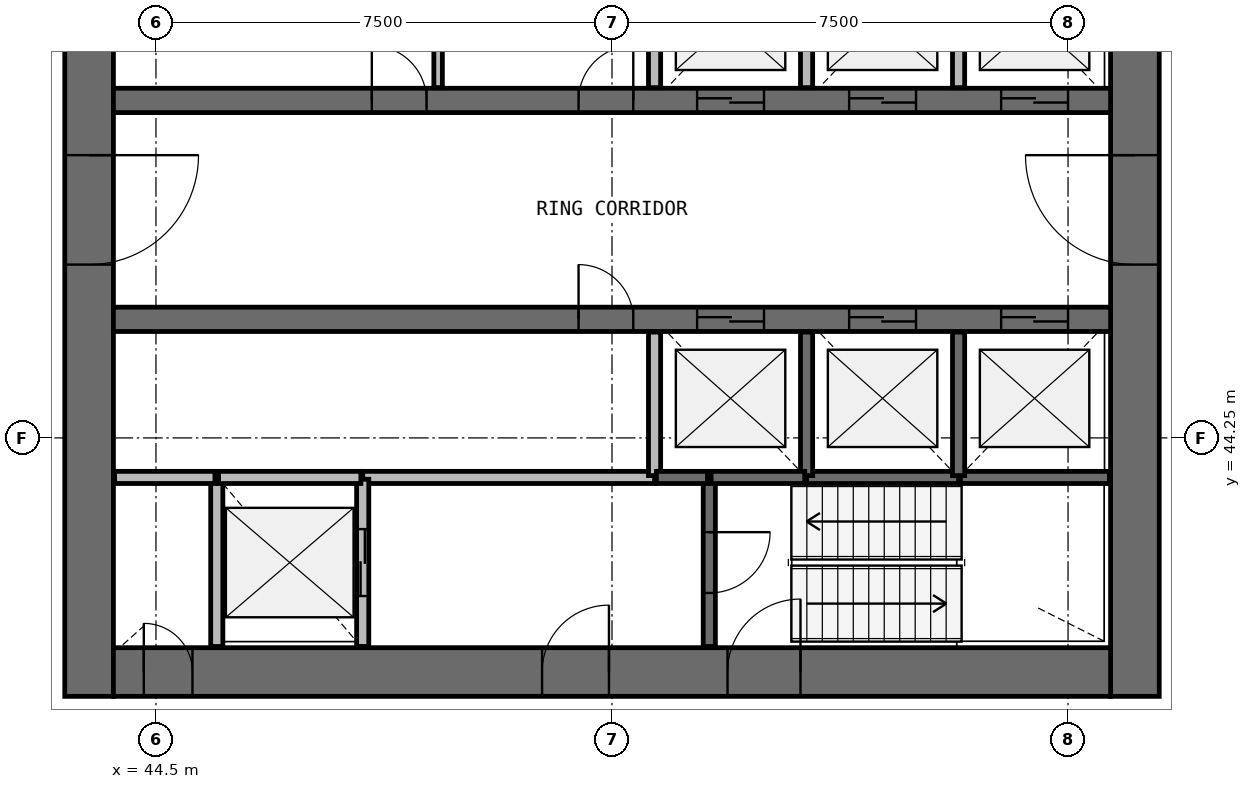
"""IFC4 building model, lengths in metres.
Left out: names, types, materials, properties, quantities, classifications, styles, units other than length and angle.
Written with IfcOpenShell. Run it as: python <this file> out.ifc"""

import sys

from ifc_helpers import new_model, si_unit, direction, frame, frame_2d, origin, place, context, subcontext, project, spatial, rectangle, extrude, source, transform, mapped, element, fill, save


model = new_model("IFC4")
c1 = context("Model", 3, precision=1e-05, world=origin(), true_north=direction((0.0, 1.0)))
c2 = subcontext(c1, "Body", "Model", "MODEL_VIEW")
j1 = project(units=[si_unit("LENGTHUNIT", "METRE"), si_unit("PLANEANGLEUNIT", "RADIAN")], contexts=[c1])
p1 = place(None, origin())
s1 = spatial("IfcSite", under=j1, at=p1, CompositionType="ELEMENT")
p2 = place(p1, origin())
s2 = spatial("IfcBuilding", under=s1, at=p2, CompositionType="ELEMENT")
p3 = place(p2, frame((0.0, 0.0, 164.3)))
s3 = spatial("IfcBuildingStorey", under=s2, at=p3, CompositionType="ELEMENT", Elevation=164.3)
p4 = place(p3, frame((60.6, 40.0, 0.0), z_axis=(0.0, 0.0, 1.0), x_axis=(0.0, 1.0, 0.0)))
e1 = element("IfcWall", 1, at=p4, inside=s3, PredefinedType="SHEAR", context=c2, shape_type="SweptSolid", body=[
    extrude(rectangle(XDim=16.0, YDim=0.8, at=frame_2d((8.0, 0.0))), origin(), (0.0, 0.0, 1.0), 3.9),
])
p5 = place(p4, frame((7.1, 0.0, 0.0)))
e2 = element("IfcOpeningElement", 2, at=p5, cuts=e1, PredefinedType="OPENING", context=c2, shape_type="SweptSolid", body=[
    extrude(rectangle(XDim=1.8, YDim=2.1, at=frame_2d((0.9, 1.05))), frame((0.0, 0.41, 0.0), z_axis=(0.0, -1.0, 0.0), x_axis=(1.0, 0.0, 0.0)), (0.0, 0.0, 1.0), 0.82),
])
p6 = place(p3, frame((43.4, 56.0, 0.0), z_axis=(0.0, 0.0, 1.0), x_axis=(0.0, -1.0, 0.0)))
e3 = element("IfcWall", 3, at=p6, inside=s3, PredefinedType="SHEAR", context=c2, shape_type="SweptSolid", body=[
    extrude(rectangle(XDim=16.0, YDim=0.8, at=frame_2d((8.0, 0.0))), origin(), (0.0, 0.0, 1.0), 3.9),
])
p7 = place(p6, frame((7.1, 0.0, 0.0)))
e4 = element("IfcOpeningElement", 4, at=p7, cuts=e3, PredefinedType="OPENING", context=c2, shape_type="SweptSolid", body=[
    extrude(rectangle(XDim=1.8, YDim=2.1, at=frame_2d((0.9, 1.05))), frame((0.0, 0.41, 0.0), z_axis=(0.0, -1.0, 0.0), x_axis=(1.0, 0.0, 0.0)), (0.0, 0.0, 1.0), 0.82),
])
p8 = place(p3, frame((43.8, 40.4, 0.0), z_axis=(0.0, 0.0, 1.0), x_axis=(1.0, 0.0, 0.0)))
e5 = element("IfcWall", 5, at=p8, inside=s3, PredefinedType="SHEAR", context=c2, shape_type="SweptSolid", body=[
    extrude(rectangle(XDim=16.4, YDim=0.8, at=frame_2d((8.2, 0.0))), origin(), (0.0, 0.0, 1.0), 3.9),
])
p9 = place(p8, frame((10.1, 0.0, 0.0)))
e6 = element("IfcOpeningElement", 6, at=p9, cuts=e5, PredefinedType="OPENING", context=c2, shape_type="SweptSolid", body=[
    extrude(rectangle(XDim=1.2, YDim=2.1, at=frame_2d((0.6, 1.05))), frame((0.0, 0.41, 0.0), z_axis=(0.0, -1.0, 0.0), x_axis=(1.0, 0.0, 0.0)), (0.0, 0.0, 1.0), 0.82),
])
p10 = place(p8, frame((7.05, 0.0, 0.0)))
e7 = element("IfcOpeningElement", 7, at=p10, cuts=e5, PredefinedType="OPENING", context=c2, shape_type="SweptSolid", body=[
    extrude(rectangle(XDim=1.1, YDim=2.1, at=frame_2d((0.55, 1.05))), frame((0.0, 0.41, 0.0), z_axis=(0.0, -1.0, 0.0), x_axis=(1.0, 0.0, 0.0)), (0.0, 0.0, 1.0), 0.82),
])
p11 = place(p8, frame((0.5, 0.0, 0.0)))
e8 = element("IfcOpeningElement", 8, at=p11, cuts=e5, PredefinedType="OPENING", context=c2, shape_type="SweptSolid", body=[
    extrude(rectangle(XDim=0.8, YDim=2.1, at=frame_2d((0.4, 1.05))), frame((0.0, 0.41, 0.0), z_axis=(0.0, -1.0, 0.0), x_axis=(1.0, 0.0, 0.0)), (0.0, 0.0, 1.0), 0.82),
])
p12 = place(p3, frame((43.8, 49.8, 0.0), z_axis=(0.0, 0.0, 1.0), x_axis=(1.0, 0.0, 0.0)))
e9 = element("IfcWall", 9, at=p12, inside=s3, PredefinedType="SHEAR", context=c2, shape_type="SweptSolid", body=[
    extrude(rectangle(XDim=16.4, YDim=0.4, at=frame_2d((8.2, 0.0))), origin(), (0.0, 0.0, 1.0), 3.9),
])
p13 = place(p12, frame((9.6, 0.0, 0.0)))
e10 = element("IfcOpeningElement", 10, at=p13, cuts=e9, PredefinedType="OPENING", context=c2, shape_type="SweptSolid", body=[
    extrude(rectangle(XDim=1.1, YDim=2.1, at=frame_2d((0.55, 1.05))), frame((0.0, 0.21, 0.0), z_axis=(0.0, -1.0, 0.0), x_axis=(1.0, 0.0, 0.0)), (0.0, 0.0, 1.0), 0.42),
])
p14 = place(p12, frame((12.1, 0.0, 0.0)))
e11 = element("IfcOpeningElement", 11, at=p14, cuts=e9, PredefinedType="OPENING", context=c2, shape_type="SweptSolid", body=[
    extrude(rectangle(XDim=1.1, YDim=2.1, at=frame_2d((0.55, 1.05))), frame((0.0, 0.21, 0.0), z_axis=(0.0, -1.0, 0.0), x_axis=(1.0, 0.0, 0.0)), (0.0, 0.0, 1.0), 0.42),
])
p15 = place(p12, frame((14.6, 0.0, 0.0)))
e12 = element("IfcOpeningElement", 12, at=p15, cuts=e9, PredefinedType="OPENING", context=c2, shape_type="SweptSolid", body=[
    extrude(rectangle(XDim=1.1, YDim=2.1, at=frame_2d((0.55, 1.05))), frame((0.0, 0.21, 0.0), z_axis=(0.0, -1.0, 0.0), x_axis=(1.0, 0.0, 0.0)), (0.0, 0.0, 1.0), 0.42),
])
p16 = place(p12, frame((4.25, 0.0, 0.0)))
e13 = element("IfcOpeningElement", 13, at=p16, cuts=e9, PredefinedType="OPENING", context=c2, shape_type="SweptSolid", body=[
    extrude(rectangle(XDim=0.9, YDim=2.1, at=frame_2d((0.45, 1.05))), frame((0.0, 0.21, 0.0), z_axis=(0.0, -1.0, 0.0), x_axis=(1.0, 0.0, 0.0)), (0.0, 0.0, 1.0), 0.42),
])
p17 = place(p12, frame((7.65, 0.0, 0.0)))
e14 = element("IfcOpeningElement", 14, at=p17, cuts=e9, PredefinedType="OPENING", context=c2, shape_type="SweptSolid", body=[
    extrude(rectangle(XDim=0.9, YDim=2.1, at=frame_2d((0.45, 1.05))), frame((0.0, 0.21, 0.0), z_axis=(0.0, -1.0, 0.0), x_axis=(1.0, 0.0, 0.0)), (0.0, 0.0, 1.0), 0.42),
])
p18 = place(p3, frame((43.8, 46.2, 0.0), z_axis=(0.0, 0.0, 1.0), x_axis=(1.0, 0.0, 0.0)))
e15 = element("IfcWall", 15, at=p18, inside=s3, PredefinedType="SHEAR", context=c2, shape_type="SweptSolid", body=[
    extrude(rectangle(XDim=16.4, YDim=0.4, at=frame_2d((8.2, 0.0))), origin(), (0.0, 0.0, 1.0), 3.9),
])
p19 = place(p18, frame((9.6, 0.0, 0.0)))
e16 = element("IfcOpeningElement", 16, at=p19, cuts=e15, PredefinedType="OPENING", context=c2, shape_type="SweptSolid", body=[
    extrude(rectangle(XDim=1.1, YDim=2.1, at=frame_2d((0.55, 1.05))), frame((0.0, 0.21, 0.0), z_axis=(0.0, -1.0, 0.0), x_axis=(1.0, 0.0, 0.0)), (0.0, 0.0, 1.0), 0.42),
])
p20 = place(p18, frame((12.1, 0.0, 0.0)))
e17 = element("IfcOpeningElement", 17, at=p20, cuts=e15, PredefinedType="OPENING", context=c2, shape_type="SweptSolid", body=[
    extrude(rectangle(XDim=1.1, YDim=2.1, at=frame_2d((0.55, 1.05))), frame((0.0, 0.21, 0.0), z_axis=(0.0, -1.0, 0.0), x_axis=(1.0, 0.0, 0.0)), (0.0, 0.0, 1.0), 0.42),
])
p21 = place(p18, frame((14.6, 0.0, 0.0)))
e18 = element("IfcOpeningElement", 18, at=p21, cuts=e15, PredefinedType="OPENING", context=c2, shape_type="SweptSolid", body=[
    extrude(rectangle(XDim=1.1, YDim=2.1, at=frame_2d((0.55, 1.05))), frame((0.0, 0.21, 0.0), z_axis=(0.0, -1.0, 0.0), x_axis=(1.0, 0.0, 0.0)), (0.0, 0.0, 1.0), 0.42),
])
p22 = place(p18, frame((7.65, 0.0, 0.0)))
e19 = element("IfcOpeningElement", 19, at=p22, cuts=e15, PredefinedType="OPENING", context=c2, shape_type="SweptSolid", body=[
    extrude(rectangle(XDim=0.9, YDim=2.1, at=frame_2d((0.45, 1.05))), frame((0.0, 0.21, 0.0), z_axis=(0.0, -1.0, 0.0), x_axis=(1.0, 0.0, 0.0)), (0.0, 0.0, 1.0), 0.42),
])
p23 = place(p3, frame((52.7, 43.6, 0.0), z_axis=(0.0, 0.0, 1.0), x_axis=(-1.0, 0.0, 0.0)))
e20 = element("IfcWall", 20, at=p23, inside=s3, PredefinedType="SOLIDWALL", context=c2, shape_type="SweptSolid", body=[
    extrude(rectangle(XDim=4.8, YDim=0.2, at=frame_2d((2.4, 0.0))), origin(), (0.0, 0.0, 1.0), 3.58),
])
p24 = place(p3, frame((45.5, 43.6, 0.0), z_axis=(0.0, 0.0, 1.0), x_axis=(0.0, -1.0, 0.0)))
e21 = element("IfcWall", 21, at=p24, inside=s3, PredefinedType="SOLIDWALL", context=c2, shape_type="SweptSolid", body=[
    extrude(rectangle(XDim=2.78, YDim=0.2, at=frame_2d((1.39, 0.0))), origin(), (0.0, 0.0, 1.0), 3.58),
])
p25 = place(p3, frame((47.9, 40.82, 0.0), z_axis=(0.0, 0.0, 1.0), x_axis=(0.0, 1.0, 0.0)))
e22 = element("IfcWall", 22, at=p25, inside=s3, PredefinedType="SOLIDWALL", context=c2, shape_type="SweptSolid", body=[
    extrude(rectangle(XDim=2.75, YDim=0.2, at=frame_2d((1.375, 0.0))), origin(), (0.0, 0.0, 1.0), 3.58),
])
p26 = place(p25, frame((0.83, 0.0, 0.0)))
e23 = element("IfcOpeningElement", 23, at=p26, cuts=e22, PredefinedType="OPENING", context=c2, shape_type="SweptSolid", body=[
    extrude(rectangle(XDim=1.1, YDim=2.1, at=frame_2d((0.55, 1.05))), frame((0.0, 0.11, 0.0), z_axis=(0.0, -1.0, 0.0), x_axis=(1.0, 0.0, 0.0)), (0.0, 0.0, 1.0), 0.22),
])
p27 = place(p3, frame((53.6, 43.6, 0.0), z_axis=(0.0, 0.0, 1.0), x_axis=(0.0, -1.0, 0.0)))
e24 = element("IfcWall", 24, at=p27, inside=s3, PredefinedType="SOLIDWALL", context=c2, shape_type="SweptSolid", body=[
    extrude(rectangle(XDim=2.78, YDim=0.2, at=frame_2d((1.39, 0.0))), origin(), (0.0, 0.0, 1.0), 3.58),
])
p28 = place(p27, frame((0.9, 0.0, 0.0)))
e25 = element("IfcOpeningElement", 25, at=p28, cuts=e24, PredefinedType="OPENING", context=c2, shape_type="SweptSolid", body=[
    extrude(rectangle(XDim=1.0, YDim=2.1, at=frame_2d((0.5, 1.05))), frame((0.0, 0.11, 0.0), z_axis=(0.0, -1.0, 0.0), x_axis=(1.0, 0.0, 0.0)), (0.0, 0.0, 1.0), 0.22),
])
p29 = place(p3, frame((55.2, 43.6, 0.0), z_axis=(0.0, 0.0, 1.0), x_axis=(1.0, 0.0, 0.0)))
e26 = element("IfcWall", 26, at=p29, inside=s3, PredefinedType="SOLIDWALL", context=c2, shape_type="SweptSolid", body=[
    extrude(rectangle(XDim=2.5, YDim=0.2, at=frame_2d((1.25, 0.0))), origin(), (0.0, 0.0, 1.0), 3.58),
])
p30 = place(p3, frame((57.73, 43.6, 0.0), z_axis=(0.0, 0.0, 1.0), x_axis=(1.0, 0.0, 0.0)))
e27 = element("IfcWall", 27, at=p30, inside=s3, PredefinedType="SOLIDWALL", context=c2, shape_type="SweptSolid", body=[
    extrude(rectangle(XDim=2.45, YDim=0.2, at=frame_2d((1.225, 0.0))), origin(), (0.0, 0.0, 1.0), 3.58),
])
p31 = place(p3, frame((47.87, 43.6, 0.0), z_axis=(0.0, 0.0, 1.0), x_axis=(-1.0, 0.0, 0.0)))
e28 = element("IfcWall", 28, at=p31, inside=s3, PredefinedType="SOLIDWALL", context=c2, shape_type="SweptSolid", body=[
    extrude(rectangle(XDim=2.34, YDim=0.2, at=frame_2d((1.17, 0.0))), origin(), (0.0, 0.0, 1.0), 3.58),
])
for number, where, z_axis, x_axis in (
    (29, (52.7, 45.99, 0.0), (0.0, 0.0, 1.0), (0.0, -1.0, 0.0)),
    (30, (52.7, 52.37, 0.0), (0.0, 0.0, 1.0), (0.0, -1.0, 0.0)),
    (31, (55.2, 43.63, 0.0), (0.0, 0.0, 1.0), (0.0, 1.0, 0.0)),
    (32, (55.2, 50.01, 0.0), (0.0, 0.0, 1.0), (0.0, 1.0, 0.0)),
    (33, (57.7, 43.63, 0.0), (0.0, 0.0, 1.0), (0.0, 1.0, 0.0)),
):
    element("IfcWall", number, at=place(p3, frame(where, z_axis=z_axis, x_axis=x_axis)), inside=s3, PredefinedType="SOLIDWALL", context=c2, shape_type="SweptSolid", body=[
        extrude(rectangle(XDim=2.36, YDim=0.2, at=frame_2d((1.18, 0.0))), origin(), (0.0, 0.0, 1.0), 3.58),
    ])
p32 = place(p3, frame((57.7, 50.01, 0.0), z_axis=(0.0, 0.0, 1.0), x_axis=(0.0, 1.0, 0.0)))
e34 = element("IfcWall", 34, at=p32, inside=s3, PredefinedType="SOLIDWALL", context=c2, shape_type="SweptSolid", body=[
    extrude(rectangle(XDim=2.39, YDim=0.2, at=frame_2d((1.195, 0.0))), origin(), (0.0, 0.0, 1.0), 3.58),
])
p33 = place(p3, frame((45.47, 43.6, 0.0), z_axis=(0.0, 0.0, 1.0), x_axis=(-1.0, 0.0, 0.0)))
e35 = element("IfcWall", 35, at=p33, inside=s3, PredefinedType="SOLIDWALL", context=c2, shape_type="SweptSolid", body=[
    extrude(rectangle(XDim=1.65, YDim=0.2, at=frame_2d((0.825, 0.0))), origin(), (0.0, 0.0, 1.0), 3.58),
])
p34 = place(p3, frame((53.63, 43.6, 0.0), z_axis=(0.0, 0.0, 1.0), x_axis=(1.0, 0.0, 0.0)))
e36 = element("IfcWall", 36, at=p34, inside=s3, PredefinedType="SOLIDWALL", context=c2, shape_type="SweptSolid", body=[
    extrude(rectangle(XDim=1.54, YDim=0.2, at=frame_2d((0.77, 0.0))), origin(), (0.0, 0.0, 1.0), 3.58),
])
p35 = place(p3, frame((52.73, 43.6, 0.0), z_axis=(0.0, 0.0, 1.0), x_axis=(1.0, 0.0, 0.0)))
e37 = element("IfcWall", 37, at=p35, inside=s3, PredefinedType="SOLIDWALL", context=c2, shape_type="SweptSolid", body=[
    extrude(rectangle(XDim=0.84, YDim=0.2, at=frame_2d((0.42, 0.0))), origin(), (0.0, 0.0, 1.0), 3.58),
])
p36 = place(p3, frame((49.14, 50.01, 0.0), z_axis=(0.0, 0.0, 1.0), x_axis=(0.0, 1.0, 0.0)))
e38 = element("IfcWall", 38, at=p36, inside=s3, PredefinedType="PARTITIONING", context=c2, shape_type="SweptSolid", body=[
    extrude(rectangle(XDim=2.29, YDim=0.14, at=frame_2d((1.145, 0.0))), origin(), (0.0, 0.0, 1.0), 2.88),
])
m1 = source(origin(), c2, "Body", "SweptSolid", [
    extrude(rectangle(XDim=1.8, YDim=2.1, at=frame_2d((0.9, 1.05))), frame((0.0, 0.025, 0.0), z_axis=(0.0, -1.0, 0.0), x_axis=(1.0, 0.0, 0.0)), (0.0, 0.0, 1.0), 0.05),
])
p37 = place(p7, origin())
e39 = element("IfcDoor", 39, at=p37, inside=s3, OperationType="SINGLE_SWING_LEFT", PredefinedType="DOOR", context=c2, shape_type="MappedRepresentation", body=[
    mapped(m1, transform((0.0, 0.0, 0.0), scale=1.0)),
])
fill(e4, e39)
p38 = place(p5, origin())
e40 = element("IfcDoor", 40, at=p38, inside=s3, OperationType="SINGLE_SWING_RIGHT", PredefinedType="DOOR", context=c2, shape_type="MappedRepresentation", body=[
    mapped(m1, transform((0.0, 0.0, 0.0), scale=1.0)),
])
fill(e2, e40)
m2 = source(origin(), c2, "Body", "SweptSolid", [
    extrude(rectangle(XDim=1.1, YDim=2.1, at=frame_2d((0.55, 1.05))), frame((0.0, 0.025, 0.0), z_axis=(0.0, -1.0, 0.0), x_axis=(1.0, 0.0, 0.0)), (0.0, 0.0, 1.0), 0.05),
])
p39 = place(p13, origin())
e41 = element("IfcDoor", 41, at=p39, inside=s3, OperationType="DOUBLE_DOOR_SLIDING", PredefinedType="USERDEFINED", context=c2, shape_type="MappedRepresentation", body=[
    mapped(m2, transform((0.0, 0.0, 0.0), scale=1.0)),
])
fill(e10, e41)
p40 = place(p14, origin())
e42 = element("IfcDoor", 42, at=p40, inside=s3, OperationType="DOUBLE_DOOR_SLIDING", PredefinedType="USERDEFINED", context=c2, shape_type="MappedRepresentation", body=[
    mapped(m2, transform((0.0, 0.0, 0.0), scale=1.0)),
])
fill(e11, e42)
p41 = place(p15, origin())
e43 = element("IfcDoor", 43, at=p41, inside=s3, OperationType="DOUBLE_DOOR_SLIDING", PredefinedType="USERDEFINED", context=c2, shape_type="MappedRepresentation", body=[
    mapped(m2, transform((0.0, 0.0, 0.0), scale=1.0)),
])
fill(e12, e43)
p42 = place(p19, origin())
e44 = element("IfcDoor", 44, at=p42, inside=s3, OperationType="DOUBLE_DOOR_SLIDING", PredefinedType="USERDEFINED", context=c2, shape_type="MappedRepresentation", body=[
    mapped(m2, transform((0.0, 0.0, 0.0), scale=1.0)),
])
fill(e16, e44)
p43 = place(p20, origin())
e45 = element("IfcDoor", 45, at=p43, inside=s3, OperationType="DOUBLE_DOOR_SLIDING", PredefinedType="USERDEFINED", context=c2, shape_type="MappedRepresentation", body=[
    mapped(m2, transform((0.0, 0.0, 0.0), scale=1.0)),
])
fill(e17, e45)
p44 = place(p21, origin())
e46 = element("IfcDoor", 46, at=p44, inside=s3, OperationType="DOUBLE_DOOR_SLIDING", PredefinedType="USERDEFINED", context=c2, shape_type="MappedRepresentation", body=[
    mapped(m2, transform((0.0, 0.0, 0.0), scale=1.0)),
])
fill(e18, e46)
p45 = place(p26, origin())
e47 = element("IfcDoor", 47, at=p45, inside=s3, OperationType="DOUBLE_DOOR_SLIDING", PredefinedType="USERDEFINED", context=c2, shape_type="MappedRepresentation", body=[
    mapped(m2, transform((0.0, 0.0, 0.0), scale=1.0)),
])
fill(e23, e47)
m3 = source(origin(), c2, "Body", "SweptSolid", [
    extrude(rectangle(XDim=1.2, YDim=2.1, at=frame_2d((0.6, 1.05))), frame((0.0, 0.025, 0.0), z_axis=(0.0, -1.0, 0.0), x_axis=(1.0, 0.0, 0.0)), (0.0, 0.0, 1.0), 0.05),
])
p46 = place(p9, origin())
e48 = element("IfcDoor", 48, at=p46, inside=s3, OperationType="SINGLE_SWING_RIGHT", PredefinedType="DOOR", context=c2, shape_type="MappedRepresentation", body=[
    mapped(m3, transform((0.0, 0.0, 0.0), scale=1.0)),
])
fill(e6, e48)
m4 = source(origin(), c2, "Body", "SweptSolid", [
    extrude(rectangle(XDim=1.0, YDim=2.1, at=frame_2d((0.5, 1.05))), frame((0.0, 0.025, 0.0), z_axis=(0.0, -1.0, 0.0), x_axis=(1.0, 0.0, 0.0)), (0.0, 0.0, 1.0), 0.05),
])
p47 = place(p28, origin())
e49 = element("IfcDoor", 49, at=p47, inside=s3, OperationType="SINGLE_SWING_LEFT", PredefinedType="DOOR", context=c2, shape_type="MappedRepresentation", body=[
    mapped(m4, transform((0.0, 0.0, 0.0), scale=1.0)),
])
fill(e25, e49)
m5 = source(origin(), c2, "Body", "SweptSolid", [
    extrude(rectangle(XDim=1.1, YDim=2.1, at=frame_2d((0.55, 1.05))), frame((0.0, 0.025, 0.0), z_axis=(0.0, -1.0, 0.0), x_axis=(1.0, 0.0, 0.0)), (0.0, 0.0, 1.0), 0.05),
])
p48 = place(p10, origin())
e50 = element("IfcDoor", 50, at=p48, inside=s3, OperationType="SINGLE_SWING_RIGHT", PredefinedType="DOOR", context=c2, shape_type="MappedRepresentation", body=[
    mapped(m5, transform((0.0, 0.0, 0.0), scale=1.0)),
])
fill(e7, e50)
m6 = source(origin(), c2, "Body", "SweptSolid", [
    extrude(rectangle(XDim=0.8, YDim=2.1, at=frame_2d((0.4, 1.05))), frame((0.0, 0.025, 0.0), z_axis=(0.0, -1.0, 0.0), x_axis=(1.0, 0.0, 0.0)), (0.0, 0.0, 1.0), 0.05),
])
p49 = place(p11, origin())
e51 = element("IfcDoor", 51, at=p49, inside=s3, OperationType="SINGLE_SWING_LEFT", PredefinedType="DOOR", context=c2, shape_type="MappedRepresentation", body=[
    mapped(m6, transform((0.0, 0.0, 0.0), scale=1.0)),
])
fill(e8, e51)
m7 = source(origin(), c2, "Body", "SweptSolid", [
    extrude(rectangle(XDim=0.9, YDim=2.1, at=frame_2d((0.45, 1.05))), frame((0.0, 0.025, 0.0), z_axis=(0.0, -1.0, 0.0), x_axis=(1.0, 0.0, 0.0)), (0.0, 0.0, 1.0), 0.05),
])
p50 = place(p16, origin())
e52 = element("IfcDoor", 52, at=p50, inside=s3, OperationType="SINGLE_SWING_LEFT", PredefinedType="DOOR", context=c2, shape_type="MappedRepresentation", body=[
    mapped(m7, transform((0.0, 0.0, 0.0), scale=1.0)),
])
fill(e13, e52)
p51 = place(p17, origin())
e53 = element("IfcDoor", 53, at=p51, inside=s3, OperationType="SINGLE_SWING_RIGHT", PredefinedType="DOOR", context=c2, shape_type="MappedRepresentation", body=[
    mapped(m7, transform((0.0, 0.0, 0.0), scale=1.0)),
])
fill(e14, e53)
p52 = place(p22, origin())
e54 = element("IfcDoor", 54, at=p52, inside=s3, OperationType="SINGLE_SWING_LEFT", PredefinedType="DOOR", context=c2, shape_type="MappedRepresentation", body=[
    mapped(m7, transform((0.0, 0.0, 0.0), scale=1.0)),
])
fill(e19, e54)
save(model, sys.argv[1])
